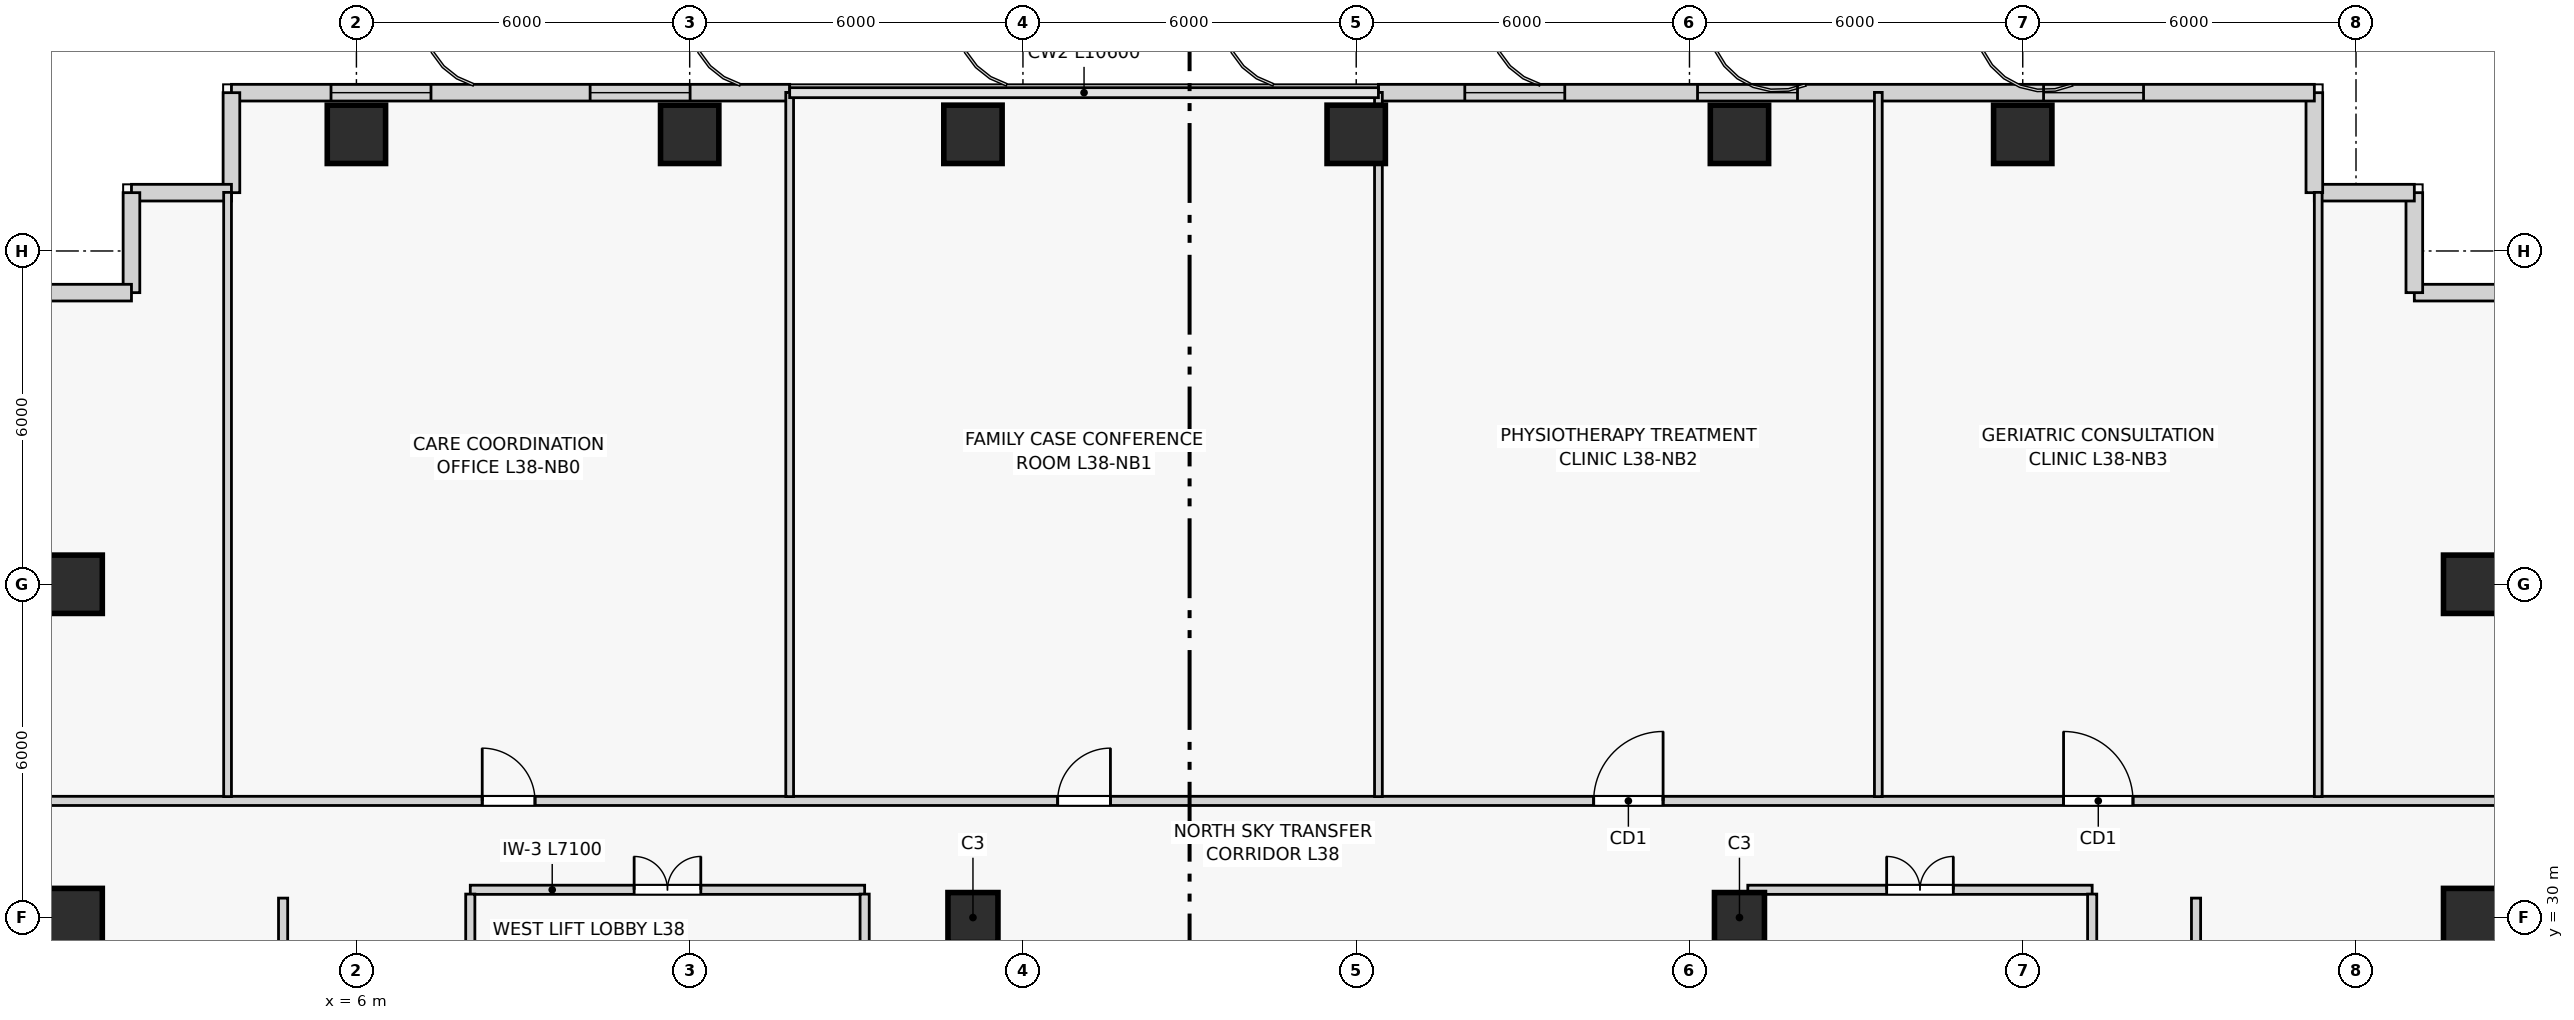
"""IFC4 building model, lengths in metres.
Left out: names, types, materials, properties, quantities, classifications, styles, units other than length and angle.
Written with IfcOpenShell. Run it as: python <this file> out.ifc"""

import sys

from ifc_helpers import new_model, si_unit, direction, frame, frame_2d, origin, origin_2d, place, context, subcontext, project, spatial, rectangle, extrude, source, transform, mapped, element, fill, save


model = new_model("IFC4")
c1 = context("Model", 3, precision=1e-05, world=origin(), true_north=direction((0.0, 1.0)))
c2 = subcontext(c1, "Body", "Model", "MODEL_VIEW")
j1 = project(units=[si_unit("LENGTHUNIT", "METRE"), si_unit("PLANEANGLEUNIT", "RADIAN")], contexts=[c1])
p1 = place(None, origin())
s1 = spatial("IfcSite", under=j1, at=p1, CompositionType="ELEMENT")
p2 = place(p1, origin())
s2 = spatial("IfcBuilding", under=s1, at=p2, CompositionType="ELEMENT")
p3 = place(p2, frame((0.0, 0.0, 144.9)))
s3 = spatial("IfcBuildingStorey", under=s2, at=p3, CompositionType="ELEMENT", Elevation=144.9)
m1 = source(origin(), c2, "Body", "SweptSolid", [
    extrude(rectangle(XDim=1.05, YDim=1.05, at=origin_2d()), origin(), (0.0, 0.0, 1.0), 3.6),
])
for number, where, z_axis, x_axis in (
    (1, (6.0, 44.1, 0.0), (0.0, 0.0, 1.0), (1.0, 0.0, 0.0)),
    (2, (12.0, 44.1, 0.0), (0.0, 0.0, 1.0), (1.0, 0.0, 0.0)),
    (3, (17.1, 44.1, 0.0), (0.0, 0.0, 1.0), (1.0, 0.0, 0.0)),
    (4, (24.0, 44.1, 0.0), (0.0, 0.0, 1.0), (1.0, 0.0, 0.0)),
    (5, (30.9, 44.1, 0.0), (0.0, 0.0, 1.0), (1.0, 0.0, 0.0)),
    (6, (36.0, 44.1, 0.0), (0.0, 0.0, 1.0), (1.0, 0.0, 0.0)),
    (7, (0.9, 30.0, 0.0), (0.0, 0.0, 1.0), (1.0, 0.0, 0.0)),
    (8, (44.1, 30.0, 0.0), (0.0, 0.0, 1.0), (1.0, 0.0, 0.0)),
    (9, (0.9, 36.0, 0.0), (0.0, 0.0, 1.0), (1.0, 0.0, 0.0)),
    (10, (44.1, 36.0, 0.0), (0.0, 0.0, 1.0), (1.0, 0.0, 0.0)),
):
    element("IfcColumn", number, at=place(p3, frame(where, z_axis=z_axis, x_axis=x_axis)), inside=s3, PredefinedType="COLUMN", context=c2, shape_type="MappedRepresentation", body=[
        mapped(m1, transform((0.0, 0.0, 0.0), scale=1.0)),
    ])
m2 = source(origin(), c2, "Body", "SweptSolid", [
    extrude(rectangle(XDim=0.9, YDim=0.9, at=origin_2d()), origin(), (0.0, 0.0, 1.0), 3.6),
])
for number, where, z_axis, x_axis in (
    (11, (17.1, 30.0, 0.0), (0.0, 0.0, 1.0), (1.0, 0.0, 0.0)),
    (12, (30.9, 30.0, 0.0), (0.0, 0.0, 1.0), (1.0, 0.0, 0.0)),
):
    element("IfcColumn", number, at=place(p3, frame(where, z_axis=z_axis, x_axis=x_axis)), inside=s3, PredefinedType="COLUMN", context=c2, shape_type="MappedRepresentation", body=[
        mapped(m2, transform((0.0, 0.0, 0.0), scale=1.0)),
    ])
for number, where, z_axis, x_axis in (
    (13, (44.85, 41.25, 0.0), (0.0, 0.0, 1.0), (-1.0, 0.0, 0.0)),
    (14, (43.05, 41.25, 0.0), (0.0, 0.0, 1.0), (0.0, 1.0, 0.0)),
    (15, (43.05, 43.05, 0.0), (0.0, 0.0, 1.0), (-1.0, 0.0, 0.0)),
    (16, (41.25, 43.05, 0.0), (0.0, 0.0, 1.0), (0.0, 1.0, 0.0)),
):
    element("IfcWall", number, at=place(p3, frame(where, z_axis=z_axis, x_axis=x_axis)), inside=s3, PredefinedType="SOLIDWALL", context=c2, shape_type="SweptSolid", body=[
        extrude(rectangle(XDim=1.8, YDim=0.3, at=frame_2d((0.9, 0.0))), origin(), (0.0, 0.0, 1.0), 3.28),
    ])
p4 = place(p3, frame((41.25, 44.85, 0.0), z_axis=(0.0, 0.0, 1.0), x_axis=(-1.0, 0.0, 0.0)))
e17 = element("IfcWall", 17, at=p4, inside=s3, PredefinedType="SOLIDWALL", context=c2, shape_type="SweptSolid", body=[
    extrude(rectangle(XDim=16.85, YDim=0.3, at=frame_2d((8.425, 0.0))), origin(), (0.0, 0.0, 1.0), 3.28),
])
p5 = place(p4, frame((3.075, 0.0, 0.8)))
e18 = element("IfcOpeningElement", 18, at=p5, cuts=e17, PredefinedType="OPENING", context=c2, shape_type="SweptSolid", body=[
    extrude(rectangle(XDim=1.8, YDim=2.1, at=frame_2d((0.9, 1.05))), frame((0.0, 0.16, 0.0), z_axis=(0.0, -1.0, 0.0), x_axis=(1.0, 0.0, 0.0)), (0.0, 0.0, 1.0), 0.32),
])
p6 = place(p4, frame((9.305, 0.0, 0.8)))
e19 = element("IfcOpeningElement", 19, at=p6, cuts=e17, PredefinedType="OPENING", context=c2, shape_type="SweptSolid", body=[
    extrude(rectangle(XDim=1.8, YDim=2.1, at=frame_2d((0.9, 1.05))), frame((0.0, 0.16, 0.0), z_axis=(0.0, -1.0, 0.0), x_axis=(1.0, 0.0, 0.0)), (0.0, 0.0, 1.0), 0.32),
])
p7 = place(p4, frame((13.495, 0.0, 0.8)))
e20 = element("IfcOpeningElement", 20, at=p7, cuts=e17, PredefinedType="OPENING", context=c2, shape_type="SweptSolid", body=[
    extrude(rectangle(XDim=1.8, YDim=2.1, at=frame_2d((0.9, 1.05))), frame((0.0, 0.16, 0.0), z_axis=(0.0, -1.0, 0.0), x_axis=(1.0, 0.0, 0.0)), (0.0, 0.0, 1.0), 0.32),
])
p8 = place(p3, frame((13.8, 44.85, 0.0), z_axis=(0.0, 0.0, 1.0), x_axis=(-1.0, 0.0, 0.0)))
e21 = element("IfcWall", 21, at=p8, inside=s3, PredefinedType="SOLIDWALL", context=c2, shape_type="SweptSolid", body=[
    extrude(rectangle(XDim=10.05, YDim=0.3, at=frame_2d((5.025, 0.0))), origin(), (0.0, 0.0, 1.0), 3.28),
])
p9 = place(p8, frame((1.792, 0.0, 0.8)))
e22 = element("IfcOpeningElement", 22, at=p9, cuts=e21, PredefinedType="OPENING", context=c2, shape_type="SweptSolid", body=[
    extrude(rectangle(XDim=1.8, YDim=2.1, at=frame_2d((0.9, 1.05))), frame((0.0, 0.16, 0.0), z_axis=(0.0, -1.0, 0.0), x_axis=(1.0, 0.0, 0.0)), (0.0, 0.0, 1.0), 0.32),
])
p10 = place(p8, frame((6.458, 0.0, 0.8)))
e23 = element("IfcOpeningElement", 23, at=p10, cuts=e21, PredefinedType="OPENING", context=c2, shape_type="SweptSolid", body=[
    extrude(rectangle(XDim=1.8, YDim=2.1, at=frame_2d((0.9, 1.05))), frame((0.0, 0.16, 0.0), z_axis=(0.0, -1.0, 0.0), x_axis=(1.0, 0.0, 0.0)), (0.0, 0.0, 1.0), 0.32),
])
for number, where, z_axis, x_axis in (
    (24, (3.75, 44.85, 0.0), (0.0, 0.0, 1.0), (0.0, -1.0, 0.0)),
    (25, (3.75, 43.05, 0.0), (0.0, 0.0, 1.0), (-1.0, 0.0, 0.0)),
    (26, (1.95, 43.05, 0.0), (0.0, 0.0, 1.0), (0.0, -1.0, 0.0)),
    (27, (1.95, 41.25, 0.0), (0.0, 0.0, 1.0), (-1.0, 0.0, 0.0)),
):
    element("IfcWall", number, at=place(p3, frame(where, z_axis=z_axis, x_axis=x_axis)), inside=s3, PredefinedType="SOLIDWALL", context=c2, shape_type="SweptSolid", body=[
        extrude(rectangle(XDim=1.8, YDim=0.3, at=frame_2d((0.9, 0.0))), origin(), (0.0, 0.0, 1.0), 3.28),
    ])
p11 = place(p3, frame((8.05, 30.5, 0.0), z_axis=(0.0, 0.0, 1.0), x_axis=(1.0, 0.0, 0.0)))
e28 = element("IfcWall", 28, at=p11, inside=s3, PredefinedType="PARTITIONING", context=c2, shape_type="SweptSolid", body=[
    extrude(rectangle(XDim=7.1, YDim=0.165, at=frame_2d((3.55, 0.0))), origin(), (0.0, 0.0, 1.0), 3.28),
])
p12 = place(p11, frame((2.95, 0.0, 0.0)))
e29 = element("IfcOpeningElement", 29, at=p12, cuts=e28, PredefinedType="OPENING", context=c2, shape_type="SweptSolid", body=[
    extrude(rectangle(XDim=1.2, YDim=2.2, at=frame_2d((0.6, 1.1))), frame((0.0, 0.093, 0.0), z_axis=(0.0, -1.0, 0.0), x_axis=(1.0, 0.0, 0.0)), (0.0, 0.0, 1.0), 0.185),
])
for number, where, z_axis, x_axis in (
    (30, (8.05, 27.47, 0.0), (0.0, 0.0, 1.0), (0.0, 1.0, 0.0)),
    (31, (15.15, 27.47, 0.0), (0.0, 0.0, 1.0), (0.0, 1.0, 0.0)),
):
    element("IfcWall", number, at=place(p3, frame(where, z_axis=z_axis, x_axis=x_axis)), inside=s3, PredefinedType="PARTITIONING", context=c2, shape_type="SweptSolid", body=[
        extrude(rectangle(XDim=2.953, YDim=0.165, at=frame_2d((1.476, 0.0))), origin(), (0.0, 0.0, 1.0), 3.28),
    ])
p13 = place(p3, frame((31.05, 30.5, 0.0), z_axis=(0.0, 0.0, 1.0), x_axis=(1.0, 0.0, 0.0)))
e32 = element("IfcWall", 32, at=p13, inside=s3, PredefinedType="PARTITIONING", context=c2, shape_type="SweptSolid", body=[
    extrude(rectangle(XDim=6.2, YDim=0.165, at=frame_2d((3.1, 0.0))), origin(), (0.0, 0.0, 1.0), 3.28),
])
p14 = place(p13, frame((2.5, 0.0, 0.0)))
e33 = element("IfcOpeningElement", 33, at=p14, cuts=e32, PredefinedType="OPENING", context=c2, shape_type="SweptSolid", body=[
    extrude(rectangle(XDim=1.2, YDim=2.2, at=frame_2d((0.6, 1.1))), frame((0.0, 0.093, 0.0), z_axis=(0.0, -1.0, 0.0), x_axis=(1.0, 0.0, 0.0)), (0.0, 0.0, 1.0), 0.185),
])
p15 = place(p3, frame((31.05, 27.47, 0.0), z_axis=(0.0, 0.0, 1.0), x_axis=(0.0, 1.0, 0.0)))
e34 = element("IfcWall", 34, at=p15, inside=s3, PredefinedType="PARTITIONING", context=c2, shape_type="SweptSolid", body=[
    extrude(rectangle(XDim=2.953, YDim=0.165, at=frame_2d((1.476, 0.0))), origin(), (0.0, 0.0, 1.0), 2.736),
])
p16 = place(p3, frame((37.25, 27.47, 0.0), z_axis=(0.0, 0.0, 1.0), x_axis=(0.0, 1.0, 0.0)))
e35 = element("IfcWall", 35, at=p16, inside=s3, PredefinedType="PARTITIONING", context=c2, shape_type="SweptSolid", body=[
    extrude(rectangle(XDim=2.953, YDim=0.165, at=frame_2d((1.476, 0.0))), origin(), (0.0, 0.0, 1.0), 3.28),
])
p17 = place(p3, frame((0.145, 32.1, 0.0), z_axis=(0.0, 0.0, 1.0), x_axis=(1.0, 0.0, 0.0)))
e36 = element("IfcWall", 36, at=p17, inside=s3, PredefinedType="PARTITIONING", context=c2, shape_type="SweptSolid", body=[
    extrude(rectangle(XDim=44.71, YDim=0.165, at=frame_2d((22.355, 0.0))), origin(), (0.0, 0.0, 1.0), 3.28),
])
p18 = place(p17, frame((8.12, 0.0, 0.0)))
e37 = element("IfcOpeningElement", 37, at=p18, cuts=e36, PredefinedType="OPENING", context=c2, shape_type="SweptSolid", body=[
    extrude(rectangle(XDim=0.95, YDim=2.1, at=frame_2d((0.475, 1.05))), frame((0.0, 0.093, 0.0), z_axis=(0.0, -1.0, 0.0), x_axis=(1.0, 0.0, 0.0)), (0.0, 0.0, 1.0), 0.185),
])
p19 = place(p17, frame((18.48, 0.0, 0.0)))
e38 = element("IfcOpeningElement", 38, at=p19, cuts=e36, PredefinedType="OPENING", context=c2, shape_type="SweptSolid", body=[
    extrude(rectangle(XDim=0.95, YDim=2.1, at=frame_2d((0.475, 1.05))), frame((0.0, 0.093, 0.0), z_axis=(0.0, -1.0, 0.0), x_axis=(1.0, 0.0, 0.0)), (0.0, 0.0, 1.0), 0.185),
])
p20 = place(p17, frame((28.13, 0.0, 0.0)))
e39 = element("IfcOpeningElement", 39, at=p20, cuts=e36, PredefinedType="OPENING", context=c2, shape_type="SweptSolid", body=[
    extrude(rectangle(XDim=1.25, YDim=2.2, at=frame_2d((0.625, 1.1))), frame((0.0, 0.093, 0.0), z_axis=(0.0, -1.0, 0.0), x_axis=(1.0, 0.0, 0.0)), (0.0, 0.0, 1.0), 0.185),
])
p21 = place(p17, frame((36.59, 0.0, 0.0)))
e40 = element("IfcOpeningElement", 40, at=p21, cuts=e36, PredefinedType="OPENING", context=c2, shape_type="SweptSolid", body=[
    extrude(rectangle(XDim=1.25, YDim=2.2, at=frame_2d((0.625, 1.1))), frame((0.0, 0.093, 0.0), z_axis=(0.0, -1.0, 0.0), x_axis=(1.0, 0.0, 0.0)), (0.0, 0.0, 1.0), 0.185),
])
p22 = place(p3, frame((4.68, 26.45, 0.0), z_axis=(0.0, 0.0, 1.0), x_axis=(0.0, 1.0, 0.0)))
e41 = element("IfcWall", 41, at=p22, inside=s3, PredefinedType="PARTITIONING", context=c2, shape_type="SweptSolid", body=[
    extrude(rectangle(XDim=3.9, YDim=0.165, at=frame_2d((1.95, 0.0))), origin(), (0.0, 0.0, 1.0), 3.28),
])
p23 = place(p22, frame((1.475, 0.0, 0.0)))
e42 = element("IfcOpeningElement", 42, at=p23, cuts=e41, PredefinedType="OPENING", context=c2, shape_type="SweptSolid", body=[
    extrude(rectangle(XDim=0.95, YDim=2.1, at=frame_2d((0.475, 1.05))), frame((0.0, 0.093, 0.0), z_axis=(0.0, -1.0, 0.0), x_axis=(1.0, 0.0, 0.0)), (0.0, 0.0, 1.0), 0.185),
])
p24 = place(p3, frame((39.12, 11.45, 0.0), z_axis=(0.0, 0.0, 1.0), x_axis=(0.0, 1.0, 0.0)))
e43 = element("IfcWall", 43, at=p24, inside=s3, PredefinedType="PARTITIONING", context=c2, shape_type="SweptSolid", body=[
    extrude(rectangle(XDim=18.9, YDim=0.165, at=frame_2d((9.45, 0.0))), origin(), (0.0, 0.0, 1.0), 3.28),
])
p25 = place(p24, frame((2.05, 0.0, 0.0)))
e44 = element("IfcOpeningElement", 44, at=p25, cuts=e43, PredefinedType="OPENING", context=c2, shape_type="SweptSolid", body=[
    extrude(rectangle(XDim=0.95, YDim=2.1, at=frame_2d((0.475, 1.05))), frame((0.0, 0.093, 0.0), z_axis=(0.0, -1.0, 0.0), x_axis=(1.0, 0.0, 0.0)), (0.0, 0.0, 1.0), 0.185),
])
p26 = place(p3, frame((3.68, 32.177, 0.0), z_axis=(0.0, 0.0, 1.0), x_axis=(0.0, 1.0, 0.0)))
e45 = element("IfcWall", 45, at=p26, inside=s3, PredefinedType="PARTITIONING", context=c2, shape_type="SweptSolid", body=[
    extrude(rectangle(XDim=10.877, YDim=0.14, at=frame_2d((5.439, 0.0))), origin(), (0.0, 0.0, 1.0), 3.28),
])
for number, where, z_axis, x_axis in (
    (46, (13.8, 32.177, 0.0), (0.0, 0.0, 1.0), (0.0, 1.0, 0.0)),
    (47, (24.4, 32.177, 0.0), (0.0, 0.0, 1.0), (0.0, 1.0, 0.0)),
    (48, (33.4, 32.177, 0.0), (0.0, 0.0, 1.0), (0.0, 1.0, 0.0)),
):
    element("IfcWall", number, at=place(p3, frame(where, z_axis=z_axis, x_axis=x_axis)), inside=s3, PredefinedType="PARTITIONING", context=c2, shape_type="SweptSolid", body=[
        extrude(rectangle(XDim=12.677, YDim=0.14, at=frame_2d((6.339, 0.0))), origin(), (0.0, 0.0, 1.0), 3.28),
    ])
p27 = place(p3, frame((41.32, 32.177, 0.0), z_axis=(0.0, 0.0, 1.0), x_axis=(0.0, 1.0, 0.0)))
e49 = element("IfcWall", 49, at=p27, inside=s3, PredefinedType="PARTITIONING", context=c2, shape_type="SweptSolid", body=[
    extrude(rectangle(XDim=10.877, YDim=0.14, at=frame_2d((5.439, 0.0))), origin(), (0.0, 0.0, 1.0), 3.28),
])
m3 = source(origin(), c2, "Body", "SweptSolid", [
    extrude(rectangle(XDim=1.8, YDim=2.1, at=frame_2d((0.9, 1.05))), frame((0.0, 0.03, 0.0), z_axis=(0.0, -1.0, 0.0), x_axis=(1.0, 0.0, 0.0)), (0.0, 0.0, 1.0), 0.06),
])
p28 = place(p5, origin())
e50 = element("IfcWindow", 50, at=p28, inside=s3, PartitioningType="SINGLE_PANEL", PredefinedType="WINDOW", context=c2, shape_type="MappedRepresentation", body=[
    mapped(m3, transform((0.0, 0.0, 0.0), scale=1.0)),
])
fill(e18, e50)
p29 = place(p6, origin())
e51 = element("IfcWindow", 51, at=p29, inside=s3, PartitioningType="SINGLE_PANEL", PredefinedType="WINDOW", context=c2, shape_type="MappedRepresentation", body=[
    mapped(m3, transform((0.0, 0.0, 0.0), scale=1.0)),
])
fill(e19, e51)
p30 = place(p7, origin())
e52 = element("IfcWindow", 52, at=p30, inside=s3, PartitioningType="SINGLE_PANEL", PredefinedType="WINDOW", context=c2, shape_type="MappedRepresentation", body=[
    mapped(m3, transform((0.0, 0.0, 0.0), scale=1.0)),
])
fill(e20, e52)
p31 = place(p9, origin())
e53 = element("IfcWindow", 53, at=p31, inside=s3, PartitioningType="SINGLE_PANEL", PredefinedType="WINDOW", context=c2, shape_type="MappedRepresentation", body=[
    mapped(m3, transform((0.0, 0.0, 0.0), scale=1.0)),
])
fill(e22, e53)
p32 = place(p10, origin())
e54 = element("IfcWindow", 54, at=p32, inside=s3, PartitioningType="SINGLE_PANEL", PredefinedType="WINDOW", context=c2, shape_type="MappedRepresentation", body=[
    mapped(m3, transform((0.0, 0.0, 0.0), scale=1.0)),
])
fill(e23, e54)
m4 = source(origin(), c2, "Body", "SweptSolid", [
    extrude(rectangle(XDim=1.2, YDim=2.2, at=frame_2d((0.6, 1.1))), frame((0.0, 0.025, 0.0), z_axis=(0.0, -1.0, 0.0), x_axis=(1.0, 0.0, 0.0)), (0.0, 0.0, 1.0), 0.05),
])
p33 = place(p12, origin())
e55 = element("IfcDoor", 55, at=p33, inside=s3, OperationType="DOUBLE_DOOR_SINGLE_SWING", PredefinedType="DOOR", context=c2, shape_type="MappedRepresentation", body=[
    mapped(m4, transform((0.0, 0.0, 0.0), scale=1.0)),
])
fill(e29, e55)
p34 = place(p14, origin())
e56 = element("IfcDoor", 56, at=p34, inside=s3, OperationType="DOUBLE_DOOR_SINGLE_SWING", PredefinedType="DOOR", context=c2, shape_type="MappedRepresentation", body=[
    mapped(m4, transform((0.0, 0.0, 0.0), scale=1.0)),
])
fill(e33, e56)
m5 = source(origin(), c2, "Body", "SweptSolid", [
    extrude(rectangle(XDim=0.95, YDim=2.1, at=frame_2d((0.475, 1.05))), frame((0.0, 0.025, 0.0), z_axis=(0.0, -1.0, 0.0), x_axis=(1.0, 0.0, 0.0)), (0.0, 0.0, 1.0), 0.05),
])
p35 = place(p18, origin())
e57 = element("IfcDoor", 57, at=p35, inside=s3, OperationType="SINGLE_SWING_LEFT", PredefinedType="DOOR", context=c2, shape_type="MappedRepresentation", body=[
    mapped(m5, transform((0.0, 0.0, 0.0), scale=1.0)),
])
fill(e37, e57)
p36 = place(p19, origin())
e58 = element("IfcDoor", 58, at=p36, inside=s3, OperationType="SINGLE_SWING_RIGHT", PredefinedType="DOOR", context=c2, shape_type="MappedRepresentation", body=[
    mapped(m5, transform((0.0, 0.0, 0.0), scale=1.0)),
])
fill(e38, e58)
m6 = source(origin(), c2, "Body", "SweptSolid", [
    extrude(rectangle(XDim=1.25, YDim=2.2, at=frame_2d((0.625, 1.1))), frame((0.0, 0.025, 0.0), z_axis=(0.0, -1.0, 0.0), x_axis=(1.0, 0.0, 0.0)), (0.0, 0.0, 1.0), 0.05),
])
p37 = place(p20, origin())
e59 = element("IfcDoor", 59, at=p37, inside=s3, OperationType="SINGLE_SWING_RIGHT", PredefinedType="DOOR", context=c2, shape_type="MappedRepresentation", body=[
    mapped(m6, transform((0.0, 0.0, 0.0), scale=1.0)),
])
fill(e39, e59)
p38 = place(p21, origin())
e60 = element("IfcDoor", 60, at=p38, inside=s3, OperationType="SINGLE_SWING_LEFT", PredefinedType="DOOR", context=c2, shape_type="MappedRepresentation", body=[
    mapped(m6, transform((0.0, 0.0, 0.0), scale=1.0)),
])
fill(e40, e60)
save(model, sys.argv[1])
